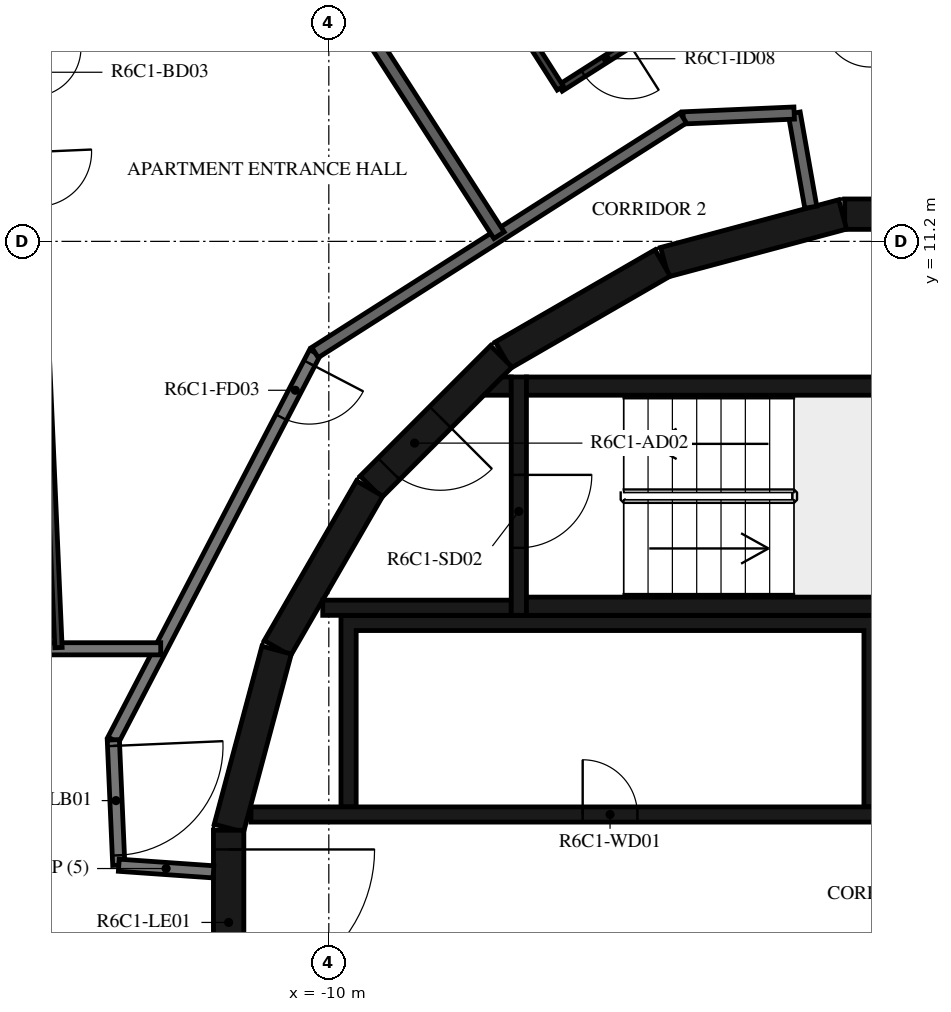
"""IFC4 building model, lengths in metres.
Left out: names, types, materials, properties, quantities, classifications, styles, units other than length and angle.
Written with IfcOpenShell. Run it as: python <this file> out.ifc"""

import sys

from ifc_helpers import new_model, si_unit, direction, frame, frame_2d, origin, place, context, subcontext, project, spatial, polyline, rectangle, outline, extrude, element, fill, save


model = new_model("IFC4")
c1 = context("Model", 3, precision=1e-05, world=origin(), true_north=direction((0.0, 1.0)))
c2 = subcontext(c1, "Body", "Model", "MODEL_VIEW")
j1 = project(units=[si_unit("LENGTHUNIT", "METRE"), si_unit("PLANEANGLEUNIT", "RADIAN")], contexts=[c1])
p1 = place(None, origin())
s1 = spatial("IfcSite", under=j1, at=p1, CompositionType="ELEMENT")
p2 = place(p1, origin())
s2 = spatial("IfcBuilding", under=s1, at=p2, CompositionType="ELEMENT")
p3 = place(p2, frame((0.0, 0.0, 251.2)))
s3 = spatial("IfcBuildingStorey", under=s2, at=p3, CompositionType="ELEMENT", Elevation=251.2)
for number, where, z_axis, x_axis in (
    (1, (1.516, 11.647, 0.0), (0.0, 0.0, 1.0), (-1.0, 0.0, 0.0)),
    (2, (-1.55, 11.643, 0.0), (0.0, 0.0, 1.0), (-0.966, -0.259, 0.0)),
    (3, (-4.51, 10.845, 0.0), (0.0, 0.0, 1.0), (-0.866, -0.5, 0.0)),
):
    element("IfcWall", number, at=place(p3, frame(where, z_axis=z_axis, x_axis=x_axis)), inside=s3, PredefinedType="SHEAR", context=c2, shape_type="SweptSolid", body=[
        extrude(rectangle(XDim=3.033, YDim=0.5, at=frame_2d((1.516, 0.0))), origin(), (0.0, 0.0, 1.0), 3.12),
    ])
p4 = place(p3, frame((-7.164, 9.308, 0.0), z_axis=(0.0, 0.0, 1.0), x_axis=(-0.707106781187, -0.707106781187, 0.0)))
e4 = element("IfcWall", 4, at=p4, inside=s3, PredefinedType="SHEAR", context=c2, shape_type="SweptSolid", body=[
    extrude(rectangle(XDim=3.032, YDim=0.5, at=frame_2d((1.516, 0.0))), origin(), (0.0, 0.0, 1.0), 3.12),
])
p5 = place(p4, frame((1.416, 0.0, 0.0)))
e5 = element("IfcOpeningElement", 5, at=p5, cuts=e4, PredefinedType="OPENING", context=c2, shape_type="SweptSolid", body=[
    extrude(rectangle(XDim=1.2, YDim=2.1, at=frame_2d((0.6, 1.05))), frame((0.0, 0.26, 0.0), z_axis=(0.0, -1.0, 0.0), x_axis=(1.0, 0.0, 0.0)), (0.0, 0.0, 1.0), 0.52),
])
for number, where, z_axis, x_axis in (
    (6, (-9.329, 7.137, 0.0), (0.0, 0.0, 1.0), (-0.5, -0.866, 0.0)),
    (7, (-10.858, 4.479, 0.0), (0.0, 0.0, 1.0), (-0.259, -0.966, 0.0)),
):
    element("IfcWall", number, at=place(p3, frame(where, z_axis=z_axis, x_axis=x_axis)), inside=s3, PredefinedType="SHEAR", context=c2, shape_type="SweptSolid", body=[
        extrude(rectangle(XDim=3.033, YDim=0.5, at=frame_2d((1.516, 0.0))), origin(), (0.0, 0.0, 1.0), 3.12),
    ])
p6 = place(p3, frame((-11.647, 1.516, 0.0), z_axis=(0.0, 0.0, 1.0), x_axis=(0.0, -1.0, 0.0)))
e8 = element("IfcWall", 8, at=p6, inside=s3, PredefinedType="SHEAR", context=c2, shape_type="SweptSolid", body=[
    extrude(rectangle(XDim=3.033, YDim=0.5, at=frame_2d((1.516, 0.0))), origin(), (0.0, 0.0, 1.0), 3.12),
])
p7 = place(p6, frame((0.316, 0.0, 0.0)))
e9 = element("IfcOpeningElement", 9, at=p7, cuts=e8, PredefinedType="OPENING", context=c2, shape_type="SweptSolid", body=[
    extrude(rectangle(XDim=2.4, YDim=2.1, at=frame_2d((1.2, 1.05))), frame((0.0, 0.26, 0.0), z_axis=(0.0, -1.0, 0.0), x_axis=(1.0, 0.0, 0.0)), (0.0, 0.0, 1.0), 0.52),
])
for number, where, z_axis, x_axis in (
    (10, (-6.75, 5.2, 0.0), (0.0, 0.0, 1.0), (1.0, 0.0, 0.0)),
    (11, (-6.75, 8.82, 0.0), (0.0, 0.0, 1.0), (1.0, 0.0, 0.0)),
):
    element("IfcWall", number, at=place(p3, frame(where, z_axis=z_axis, x_axis=x_axis)), inside=s3, PredefinedType="SHEAR", context=c2, shape_type="SweptSolid", body=[
        extrude(rectangle(XDim=6.75, YDim=0.3, at=frame_2d((3.375, 0.0))), origin(), (0.0, 0.0, 1.0), 3.12),
    ])
p8 = place(p3, frame((-6.875, 8.97, 0.0), z_axis=(0.0, 0.0, 1.0), x_axis=(0.0, -1.0, 0.0)))
e12 = element("IfcWall", 12, at=p8, inside=s3, PredefinedType="SHEAR", context=c2, shape_type="SweptSolid", body=[
    extrude(rectangle(XDim=3.92, YDim=0.25, at=frame_2d((1.96, 0.0))), origin(), (0.0, 0.0, 1.0), 3.12),
])
p9 = place(p8, frame((1.61, 0.0, 0.0)))
e13 = element("IfcOpeningElement", 13, at=p9, cuts=e12, PredefinedType="OPENING", context=c2, shape_type="SweptSolid", body=[
    extrude(rectangle(XDim=1.2, YDim=2.1, at=frame_2d((0.6, 1.05))), frame((0.0, 0.135, 0.0), z_axis=(0.0, -1.0, 0.0), x_axis=(1.0, 0.0, 0.0)), (0.0, 0.0, 1.0), 0.27),
])
p10 = place(p3, frame((-7.0, 5.175, 0.0), z_axis=(0.0, 0.0, 1.0), x_axis=(-1.0, 0.0, 0.0)))
e14 = element("IfcWall", 14, at=p10, inside=s3, PredefinedType="SHEAR", context=c2, shape_type="SweptSolid", body=[
    extrude(rectangle(XDim=3.1, YDim=0.25, at=frame_2d((1.55, 0.0))), origin(), (0.0, 0.0, 1.0), 3.12),
])
p11 = place(p3, origin())
e15 = element("IfcWall", 15, at=p11, inside=s3, PredefinedType="SHEAR", context=c2, shape_type="SweptSolid", body=[
    extrude(outline(polyline([(-7.148, 8.97), (-7.0, 8.97), (-7.0, 8.67), (-7.448, 8.67), (-7.148, 8.97)])), origin(), (0.0, 0.0, 1.0), 3.12),
])
p12 = place(p3, origin())
e16 = element("IfcWall", 16, at=p12, inside=s3, PredefinedType="SHEAR", context=c2, shape_type="SweptSolid", body=[
    extrude(outline(polyline([(-9.55, 4.8), (-1.2, 4.8), (-1.2, 1.9), (-0.95, 1.9), (-0.95, 4.8), (0.95, 4.8), (0.95, 1.9), (1.2, 1.9), (1.2, 4.8), (3.1, 4.8), (3.1, 1.9), (3.35, 1.9), (3.35, 4.8), (5.25, 4.8), (5.25, 1.9), (5.5, 1.9), (5.5, 4.8), (7.4, 4.8), (7.4, 1.9), (7.65, 1.9), (7.65, 4.8), (9.55, 4.8), (9.55, 1.9), (9.8, 1.9), (9.8, 4.8), (9.8, 5.05), (-9.8, 5.05), (-9.8, 4.8), (-9.8, 1.9), (-9.55, 1.9), (-9.55, 4.8)])), origin(), (0.0, 0.0, 1.0), 3.12),
])
p13 = place(p3, frame((-11.28, 1.775, 0.0), z_axis=(0.0, 0.0, 1.0), x_axis=(1.0, 0.0, 0.0)))
e17 = element("IfcWall", 17, at=p13, inside=s3, PredefinedType="SHEAR", context=c2, shape_type="SweptSolid", body=[
    extrude(rectangle(XDim=14.38, YDim=0.25, at=frame_2d((7.19, 0.0))), origin(), (0.0, 0.0, 1.0), 3.12),
])
p14 = place(p13, frame((10.73, 0.0, 0.0)))
e18 = element("IfcOpeningElement", 18, at=p14, cuts=e17, PredefinedType="OPENING", context=c2, shape_type="SweptSolid", body=[
    extrude(rectangle(XDim=1.1, YDim=2.1, at=frame_2d((0.55, 1.05))), frame((0.0, 0.135, 0.0), z_axis=(0.0, -1.0, 0.0), x_axis=(1.0, 0.0, 0.0)), (0.0, 0.0, 1.0), 0.27),
])
p15 = place(p13, frame((12.88, 0.0, 0.0)))
e19 = element("IfcOpeningElement", 19, at=p15, cuts=e17, PredefinedType="OPENING", context=c2, shape_type="SweptSolid", body=[
    extrude(rectangle(XDim=1.1, YDim=2.1, at=frame_2d((0.55, 1.05))), frame((0.0, 0.135, 0.0), z_axis=(0.0, -1.0, 0.0), x_axis=(1.0, 0.0, 0.0)), (0.0, 0.0, 1.0), 0.27),
])
p16 = place(p13, frame((5.455, 0.0, 0.0)))
e20 = element("IfcOpeningElement", 20, at=p16, cuts=e17, PredefinedType="OPENING", context=c2, shape_type="SweptSolid", body=[
    extrude(rectangle(XDim=0.9, YDim=2.1, at=frame_2d((0.45, 1.05))), frame((0.0, 0.135, 0.0), z_axis=(0.0, -1.0, 0.0), x_axis=(1.0, 0.0, 0.0)), (0.0, 0.0, 1.0), 0.27),
])
p17 = place(p3, frame((-10.228, 9.372, 0.0), z_axis=(0.0, 0.0, 1.0), x_axis=(-0.461759464021, -0.887005184532, 0.0)))
e21 = element("IfcWall", 21, at=p17, inside=s3, PredefinedType="STANDARD", context=c2, shape_type="SweptSolid", body=[
    extrude(rectangle(XDim=7.181, YDim=0.2, at=frame_2d((3.591, 0.0))), origin(), (0.0, 0.0, 1.0), 3.12),
])
p18 = place(p17, frame((0.2, 0.0, 0.0)))
e22 = element("IfcOpeningElement", 22, at=p18, cuts=e21, PredefinedType="OPENING", context=c2, shape_type="SweptSolid", body=[
    extrude(rectangle(XDim=1.0, YDim=2.1, at=frame_2d((0.5, 1.05))), frame((0.0, 0.11, 0.0), z_axis=(0.0, -1.0, 0.0), x_axis=(1.0, 0.0, 0.0)), (0.0, 0.0, 1.0), 0.22),
])
p19 = place(p3, frame((-13.544, 3.003, 0.0), z_axis=(0.0, 0.0, 1.0), x_axis=(0.043652842459, -0.99904676034, 0.0)))
e23 = element("IfcWall", 23, at=p19, inside=s3, PredefinedType="STANDARD", context=c2, shape_type="SweptSolid", body=[
    extrude(rectangle(XDim=2.064, YDim=0.2, at=frame_2d((1.032, 0.0))), origin(), (0.0, 0.0, 1.0), 3.12),
])
p20 = place(p19, frame((0.1, 0.0, 0.0)))
e24 = element("IfcOpeningElement", 24, at=p20, cuts=e23, PredefinedType="OPENING", context=c2, shape_type="SweptSolid", body=[
    extrude(rectangle(XDim=1.8, YDim=2.1, at=frame_2d((0.9, 1.05))), frame((0.0, 0.11, 0.0), z_axis=(0.0, -1.0, 0.0), x_axis=(1.0, 0.0, 0.0)), (0.0, 0.0, 1.0), 0.22),
])
p21 = place(p3, frame((-13.454, 0.941, 0.0), z_axis=(0.0, 0.0, 1.0), x_axis=(0.99755155062, -0.069934997354, 0.0)))
e25 = element("IfcWall", 25, at=p21, inside=s3, PredefinedType="STANDARD", context=c2, shape_type="SweptSolid", body=[
    extrude(rectangle(XDim=1.561, YDim=0.2, at=frame_2d((0.78, 0.0))), origin(), (0.0, 0.0, 1.0), 3.12),
])
p22 = place(p3, frame((-2.074, 11.761, 0.0), z_axis=(0.0, 0.0, 1.0), x_axis=(-0.173679082312, 0.984802303189, 0.0)))
e26 = element("IfcWall", 26, at=p22, inside=s3, PredefinedType="STANDARD", context=c2, shape_type="SweptSolid", body=[
    extrude(rectangle(XDim=1.573, YDim=0.2, at=frame_2d((0.787, 0.0))), origin(), (0.0, 0.0, 1.0), 3.12),
])
p23 = place(p3, frame((-2.347, 13.31, 0.0), z_axis=(0.0, 0.0, 1.0), x_axis=(-0.999050095671, -0.043576442492, 0.0)))
e27 = element("IfcWall", 27, at=p23, inside=s3, PredefinedType="STANDARD", context=c2, shape_type="SweptSolid", body=[
    extrude(rectangle(XDim=1.826, YDim=0.2, at=frame_2d((0.913, 0.0))), origin(), (0.0, 0.0, 1.0), 3.12),
])
p24 = place(p3, frame((-4.172, 13.231, 0.0), z_axis=(0.0, 0.0, 1.0), x_axis=(-0.843388394728, -0.537304397561, 0.0)))
e28 = element("IfcWall", 28, at=p24, inside=s3, PredefinedType="STANDARD", context=c2, shape_type="SweptSolid", body=[
    extrude(rectangle(XDim=7.181, YDim=0.2, at=frame_2d((3.59, 0.0))), origin(), (0.0, 0.0, 1.0), 3.12),
])
p25 = place(p3, frame((-12.764, 4.5, 0.0), z_axis=(0.0, 0.0, 1.0), x_axis=(-1.0, 0.0, 0.0)))
e29 = element("IfcWall", 29, at=p25, inside=s3, PredefinedType="STANDARD", context=c2, shape_type="SweptSolid", body=[
    extrude(rectangle(XDim=4.086, YDim=0.2, at=frame_2d((2.043, 0.0))), origin(), (0.0, 0.0, 1.0), 3.12),
])
p26 = place(p3, frame((-9.69, 15.171, 0.0), z_axis=(0.0, 0.0, 1.0), x_axis=(0.540961372678, -0.841047438181, 0.0)))
e30 = element("IfcWall", 30, at=p26, inside=s3, PredefinedType="STANDARD", context=c2, shape_type="SweptSolid", body=[
    extrude(rectangle(XDim=4.602, YDim=0.2, at=frame_2d((2.301, 0.0))), origin(), (0.0, 0.0, 1.0), 3.12),
])
p27 = place(p3, frame((-4.888, 14.553, 0.0), z_axis=(0.0, 0.0, 1.0), x_axis=(-0.843349608892, -0.537365273517, 0.0)))
e31 = element("IfcWall", 31, at=p27, inside=s3, PredefinedType="PARTITIONING", context=c2, shape_type="SweptSolid", body=[
    extrude(rectangle(XDim=1.548, YDim=0.12, at=frame_2d((0.774, 0.0))), origin(), (0.0, 0.0, 1.0), 3.12),
])
p28 = place(p27, frame((0.2, 0.0, 0.0)))
e32 = element("IfcOpeningElement", 32, at=p28, cuts=e31, PredefinedType="OPENING", context=c2, shape_type="SweptSolid", body=[
    extrude(rectangle(XDim=0.9, YDim=2.1, at=frame_2d((0.45, 1.05))), frame((0.0, 0.07, 0.0), z_axis=(0.0, -1.0, 0.0), x_axis=(1.0, 0.0, 0.0)), (0.0, 0.0, 1.0), 0.14),
])
p29 = place(p3, frame((-6.194, 13.721, 0.0), z_axis=(0.0, 0.0, 1.0), x_axis=(-0.537316807294, 0.843380488629, 0.0)))
e33 = element("IfcWall", 33, at=p29, inside=s3, PredefinedType="PARTITIONING", context=c2, shape_type="SweptSolid", body=[
    extrude(rectangle(XDim=4.331, YDim=0.12, at=frame_2d((2.165, 0.0))), origin(), (0.0, 0.0, 1.0), 3.12),
])
p30 = place(p3, frame((-14.955, 16.187, 0.0), z_axis=(0.0, 0.0, 1.0), x_axis=(0.04360777668, -0.999048728448, 0.0)))
e34 = element("IfcWall", 34, at=p30, inside=s3, PredefinedType="PARTITIONING", context=c2, shape_type="SweptSolid", body=[
    extrude(rectangle(XDim=11.679, YDim=0.12, at=frame_2d((5.839, 0.0))), origin(), (0.0, 0.0, 1.0), 3.12),
])
p31 = place(p30, frame((1.808, 0.0, 0.0)))
e35 = element("IfcOpeningElement", 35, at=p31, cuts=e34, PredefinedType="OPENING", context=c2, shape_type="SweptSolid", body=[
    extrude(rectangle(XDim=0.8, YDim=2.1, at=frame_2d((0.4, 1.05))), frame((0.0, 0.07, 0.0), z_axis=(0.0, -1.0, 0.0), x_axis=(1.0, 0.0, 0.0)), (0.0, 0.0, 1.0), 0.14),
])
p32 = place(p30, frame((3.519, 0.0, 0.0)))
e36 = element("IfcOpeningElement", 36, at=p32, cuts=e34, PredefinedType="OPENING", context=c2, shape_type="SweptSolid", body=[
    extrude(rectangle(XDim=0.9, YDim=2.1, at=frame_2d((0.45, 1.05))), frame((0.0, 0.07, 0.0), z_axis=(0.0, -1.0, 0.0), x_axis=(1.0, 0.0, 0.0)), (0.0, 0.0, 1.0), 0.14),
])
p33 = place(p9, origin())
e37 = element("IfcDoor", 37, at=p33, inside=s3, OperationType="SINGLE_SWING_LEFT", PredefinedType="DOOR", context=c2, shape_type="SweptSolid", body=[
    extrude(rectangle(XDim=1.2, YDim=2.1, at=frame_2d((0.6, 1.05))), frame((0.0, 0.025, 0.0), z_axis=(0.0, -1.0, 0.0), x_axis=(1.0, 0.0, 0.0)), (0.0, 0.0, 1.0), 0.05),
])
fill(e13, e37)
p34 = place(p5, origin())
e38 = element("IfcDoor", 38, at=p34, inside=s3, OperationType="SINGLE_SWING_RIGHT", PredefinedType="DOOR", context=c2, shape_type="SweptSolid", body=[
    extrude(rectangle(XDim=1.2, YDim=2.1, at=frame_2d((0.6, 1.05))), frame((0.0, 0.025, 0.0), z_axis=(0.0, -1.0, 0.0), x_axis=(1.0, 0.0, 0.0)), (0.0, 0.0, 1.0), 0.05),
])
fill(e5, e38)
p35 = place(p7, origin())
e39 = element("IfcDoor", 39, at=p35, inside=s3, OperationType="DOUBLE_DOOR_SINGLE_SWING", PredefinedType="DOOR", context=c2, shape_type="SweptSolid", body=[
    extrude(rectangle(XDim=2.4, YDim=2.1, at=frame_2d((1.2, 1.05))), frame((0.0, 0.025, 0.0), z_axis=(0.0, -1.0, 0.0), x_axis=(1.0, 0.0, 0.0)), (0.0, 0.0, 1.0), 0.05),
])
fill(e9, e39)
p36 = place(p16, origin())
e40 = element("IfcDoor", 40, at=p36, inside=s3, OperationType="SINGLE_SWING_LEFT", PredefinedType="DOOR", context=c2, shape_type="SweptSolid", body=[
    extrude(rectangle(XDim=0.9, YDim=2.1, at=frame_2d((0.45, 1.05))), frame((0.0, 0.025, 0.0), z_axis=(0.0, -1.0, 0.0), x_axis=(1.0, 0.0, 0.0)), (0.0, 0.0, 1.0), 0.05),
])
fill(e20, e40)
p37 = place(p28, origin())
e41 = element("IfcDoor", 41, at=p37, inside=s3, OperationType="SINGLE_SWING_RIGHT", PredefinedType="DOOR", context=c2, shape_type="SweptSolid", body=[
    extrude(rectangle(XDim=0.9, YDim=2.1, at=frame_2d((0.45, 1.05))), frame((0.0, 0.025, 0.0), z_axis=(0.0, -1.0, 0.0), x_axis=(1.0, 0.0, 0.0)), (0.0, 0.0, 1.0), 0.05),
])
fill(e32, e41)
p38 = place(p18, origin())
e42 = element("IfcDoor", 42, at=p38, inside=s3, OperationType="SINGLE_SWING_LEFT", PredefinedType="DOOR", context=c2, shape_type="SweptSolid", body=[
    extrude(rectangle(XDim=1.0, YDim=2.1, at=frame_2d((0.5, 1.05))), frame((0.0, 0.025, 0.0), z_axis=(0.0, -1.0, 0.0), x_axis=(1.0, 0.0, 0.0)), (0.0, 0.0, 1.0), 0.05),
])
fill(e22, e42)
p39 = place(p20, origin())
e43 = element("IfcDoor", 43, at=p39, inside=s3, OperationType="DOUBLE_DOOR_SINGLE_SWING", PredefinedType="DOOR", context=c2, shape_type="SweptSolid", body=[
    extrude(rectangle(XDim=1.8, YDim=2.1, at=frame_2d((0.9, 1.05))), frame((0.0, 0.025, 0.0), z_axis=(0.0, -1.0, 0.0), x_axis=(1.0, 0.0, 0.0)), (0.0, 0.0, 1.0), 0.05),
])
fill(e24, e43)
save(model, sys.argv[1])
